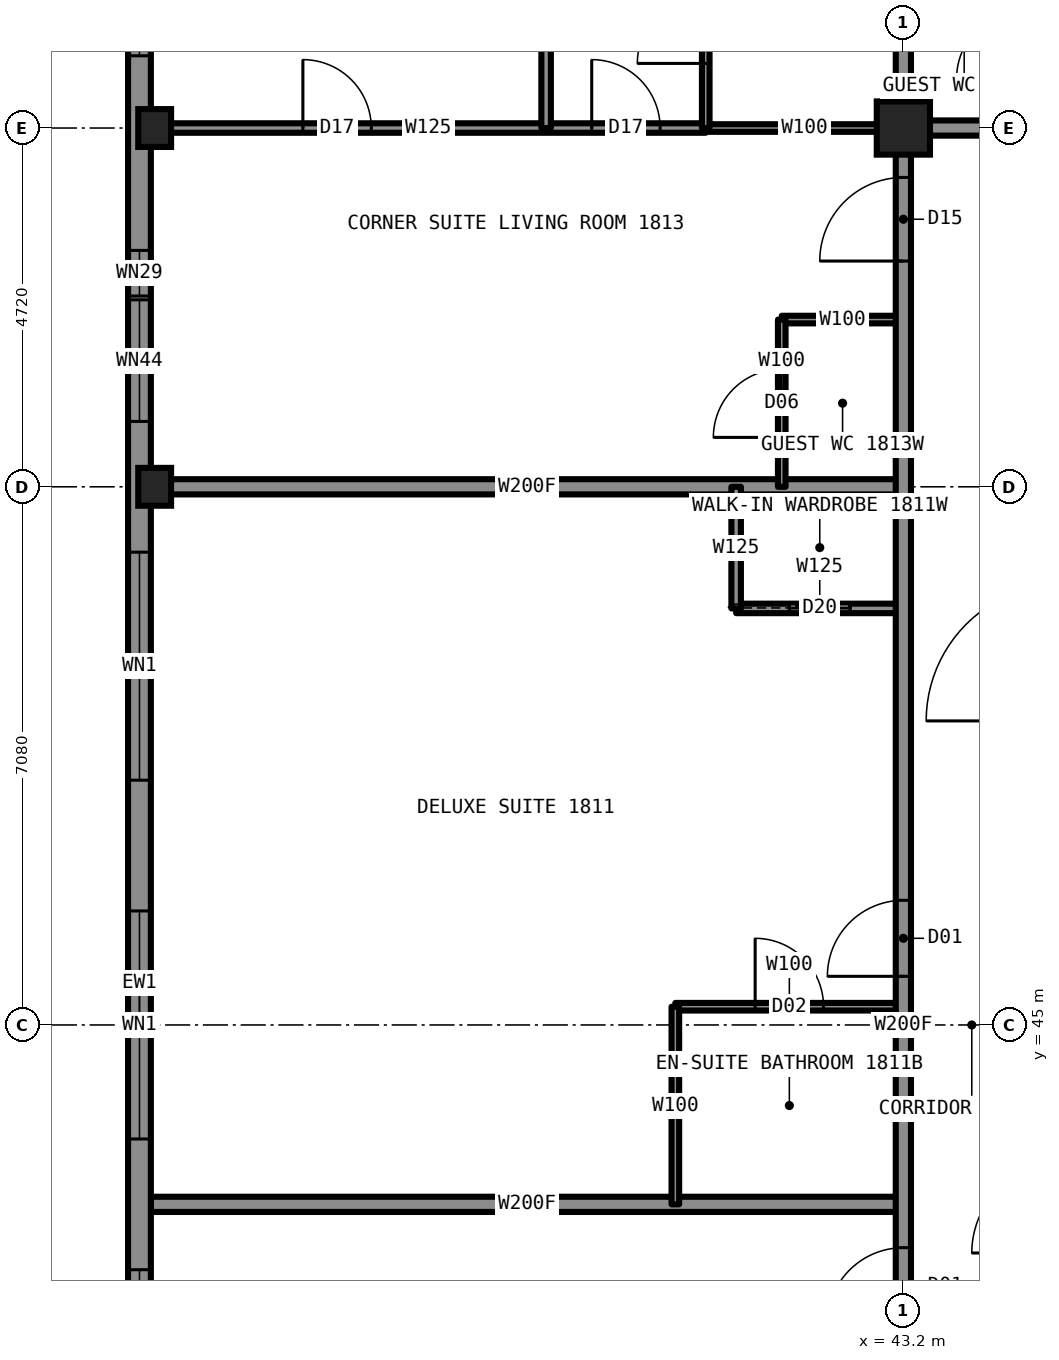
"""IFC4 building model, lengths in metres.
Left out: names, types, materials, properties, quantities, classifications, styles, units other than length and angle.
Written with IfcOpenShell. Run it as: python <this file> out.ifc"""

import sys

from ifc_helpers import new_model, si_unit, direction, frame, frame_2d, origin, origin_2d, place, context, subcontext, project, spatial, rectangle, hollow_rectangle, i_section, extrude, element, fill, save


model = new_model("IFC4")
c1 = context("Model", 3, precision=1e-05, world=origin(), true_north=direction((0.0, 1.0)))
c2 = subcontext(c1, "Body", "Model", "MODEL_VIEW")
j1 = project(units=[si_unit("LENGTHUNIT", "METRE"), si_unit("PLANEANGLEUNIT", "RADIAN")], contexts=[c1])
p1 = place(None, origin())
s1 = spatial("IfcSite", under=j1, at=p1, CompositionType="ELEMENT")
p2 = place(p1, origin())
s2 = spatial("IfcBuilding", under=s1, at=p2, CompositionType="ELEMENT")
p3 = place(p2, frame((0.0, 0.0, 70.5)))
s3 = spatial("IfcBuildingStorey", under=s2, at=p3, CompositionType="ELEMENT", Elevation=70.5)
for number, where, z_axis, x_axis in (
    (1, (33.35, 52.08, 0.0), (0.0, 0.0, 1.0), (1.0, 0.0, 0.0)),
    (2, (33.35, 56.8, 0.0), (0.0, 0.0, 1.0), (1.0, 0.0, 0.0)),
):
    element("IfcColumn", number, at=place(p3, frame(where, z_axis=z_axis, x_axis=x_axis)), inside=s3, PredefinedType="COLUMN", context=c2, shape_type="SweptSolid", body=[
        extrude(i_section(OverallWidth=0.432, OverallDepth=0.498, WebThickness=0.056, FlangeThickness=0.089, at=origin_2d()), origin(), (0.0, 0.0, 1.0), 3.5),
    ])
p4 = place(p3, frame((43.2, 56.8, 0.0), z_axis=(0.0, 0.0, 1.0), x_axis=(1.0, 0.0, 0.0)))
e3 = element("IfcColumn", 3, at=p4, inside=s3, PredefinedType="COLUMN", context=c2, shape_type="SweptSolid", body=[
    extrude(hollow_rectangle(XDim=0.7, YDim=0.7, WallThickness=0.06, at=origin_2d()), origin(), (0.0, 0.0, 1.0), 3.5),
])
p5 = place(p3, frame((33.3, 42.64, 0.0), z_axis=(0.0, 0.0, 1.0), x_axis=(1.0, 0.0, 0.0)))
e4 = element("IfcWall", 4, at=p5, inside=s3, PredefinedType="PARTITIONING", context=c2, shape_type="SweptSolid", body=[
    extrude(rectangle(XDim=9.9, YDim=0.2, at=frame_2d((4.95, 0.0))), origin(), (0.0, 0.0, 1.0), 2.723),
])
p6 = place(p3, frame((40.2, 45.24, 0.0), z_axis=(0.0, 0.0, 1.0), x_axis=(1.0, 0.0, 0.0)))
e5 = element("IfcWall", 5, at=p6, inside=s3, PredefinedType="PARTITIONING", context=c2, shape_type="SweptSolid", body=[
    extrude(rectangle(XDim=3.0, YDim=0.1, at=frame_2d((1.5, 0.0))), origin(), (0.0, 0.0, 1.0), 3.33),
])
p7 = place(p6, frame((1.05, 0.0, 0.0)))
e6 = element("IfcOpeningElement", 6, at=p7, cuts=e5, PredefinedType="OPENING", context=c2, shape_type="SweptSolid", body=[
    extrude(rectangle(XDim=0.9, YDim=2.1, at=frame_2d((0.45, 1.05))), frame((0.0, 0.06, 0.0), z_axis=(0.0, -1.0, 0.0), x_axis=(1.0, 0.0, 0.0)), (0.0, 0.0, 1.0), 0.12),
])
p8 = place(p3, frame((40.6, 56.8, 0.0), z_axis=(0.0, 0.0, 1.0), x_axis=(1.0, 0.0, 0.0)))
e7 = element("IfcWall", 7, at=p8, inside=s3, PredefinedType="PARTITIONING", context=c2, shape_type="SweptSolid", body=[
    extrude(rectangle(XDim=2.6, YDim=0.1, at=frame_2d((1.3, 0.0))), origin(), (0.0, 0.0, 1.0), 2.573),
])
p9 = place(p3, frame((43.2, 56.8, 0.0), z_axis=(0.0, 0.0, 1.0), x_axis=(1.0, 0.0, 0.0)))
e8 = element("IfcWall", 8, at=p9, inside=s3, PredefinedType="PARTITIONING", context=c2, shape_type="SweptSolid", body=[
    extrude(rectangle(XDim=23.6, YDim=0.2, at=frame_2d((11.8, 0.0))), origin(), (0.0, 0.0, 1.0), 3.33),
])
p10 = place(p9, frame((1.85, 0.0, 0.0)))
e9 = element("IfcOpeningElement", 9, at=p10, cuts=e8, PredefinedType="OPENING", context=c2, shape_type="SweptSolid", body=[
    extrude(rectangle(XDim=1.1, YDim=2.2, at=frame_2d((0.55, 1.1))), frame((0.0, 0.11, 0.0), z_axis=(0.0, -1.0, 0.0), x_axis=(1.0, 0.0, 0.0)), (0.0, 0.0, 1.0), 0.22),
])
p11 = place(p9, frame((17.16, 0.0, 0.0)))
e10 = element("IfcOpeningElement", 10, at=p11, cuts=e8, PredefinedType="OPENING", context=c2, shape_type="SweptSolid", body=[
    extrude(rectangle(XDim=1.0, YDim=2.2, at=frame_2d((0.5, 1.1))), frame((0.0, 0.11, 0.0), z_axis=(0.0, -1.0, 0.0), x_axis=(1.0, 0.0, 0.0)), (0.0, 0.0, 1.0), 0.22),
])
p12 = place(p3, frame((33.3, 56.8, 0.0), z_axis=(0.0, 0.0, 1.0), x_axis=(1.0, 0.0, 0.0)))
e11 = element("IfcWall", 11, at=p12, inside=s3, PredefinedType="PARTITIONING", context=c2, shape_type="SweptSolid", body=[
    extrude(rectangle(XDim=7.3, YDim=0.125, at=frame_2d((3.65, 0.0))), origin(), (0.0, 0.0, 1.0), 2.573),
])
p13 = place(p12, frame((5.8, 0.0, 0.0)))
e12 = element("IfcOpeningElement", 12, at=p13, cuts=e11, PredefinedType="OPENING", context=c2, shape_type="SweptSolid", body=[
    extrude(rectangle(XDim=0.9, YDim=2.2, at=frame_2d((0.45, 1.1))), frame((0.0, 0.073, 0.0), z_axis=(0.0, -1.0, 0.0), x_axis=(1.0, 0.0, 0.0)), (0.0, 0.0, 1.0), 0.145),
])
p14 = place(p12, frame((2.0, 0.0, 0.0)))
e13 = element("IfcOpeningElement", 13, at=p14, cuts=e11, PredefinedType="OPENING", context=c2, shape_type="SweptSolid", body=[
    extrude(rectangle(XDim=0.9, YDim=2.2, at=frame_2d((0.45, 1.1))), frame((0.0, 0.073, 0.0), z_axis=(0.0, -1.0, 0.0), x_axis=(1.0, 0.0, 0.0)), (0.0, 0.0, 1.0), 0.145),
])
p15 = place(p3, frame((41.0, 50.48, 0.0), z_axis=(0.0, 0.0, 1.0), x_axis=(1.0, 0.0, 0.0)))
e14 = element("IfcWall", 14, at=p15, inside=s3, PredefinedType="PARTITIONING", context=c2, shape_type="SweptSolid", body=[
    extrude(rectangle(XDim=2.2, YDim=0.125, at=frame_2d((1.1, 0.0))), origin(), (0.0, 0.0, 1.0), 3.33),
])
p16 = place(p15, frame((0.7, 0.0, 0.0)))
e15 = element("IfcOpeningElement", 15, at=p16, cuts=e14, PredefinedType="OPENING", context=c2, shape_type="SweptSolid", body=[
    extrude(rectangle(XDim=0.8, YDim=2.1, at=frame_2d((0.4, 1.05))), frame((0.0, 0.073, 0.0), z_axis=(0.0, -1.0, 0.0), x_axis=(1.0, 0.0, 0.0)), (0.0, 0.0, 1.0), 0.145),
])
p17 = place(p3, frame((33.3, 52.08, 0.0), z_axis=(0.0, 0.0, 1.0), x_axis=(1.0, 0.0, 0.0)))
e16 = element("IfcWall", 16, at=p17, inside=s3, PredefinedType="PARTITIONING", context=c2, shape_type="SweptSolid", body=[
    extrude(rectangle(XDim=9.9, YDim=0.2, at=frame_2d((4.95, 0.0))), origin(), (0.0, 0.0, 1.0), 2.573),
])
p18 = place(p3, frame((41.6, 54.28, 0.0), z_axis=(0.0, 0.0, 1.0), x_axis=(1.0, 0.0, 0.0)))
e17 = element("IfcWall", 17, at=p18, inside=s3, PredefinedType="PARTITIONING", context=c2, shape_type="SweptSolid", body=[
    extrude(rectangle(XDim=1.6, YDim=0.1, at=frame_2d((0.8, 0.0))), origin(), (0.0, 0.0, 1.0), 2.723),
])
p19 = place(p3, frame((43.2, 33.2, 0.0), z_axis=(0.0, 0.0, 1.0), x_axis=(0.0, 1.0, 0.0)))
e18 = element("IfcWall", 18, at=p19, inside=s3, PredefinedType="PARTITIONING", context=c2, shape_type="SweptSolid", body=[
    extrude(rectangle(XDim=23.6, YDim=0.2, at=frame_2d((11.8, 0.0))), origin(), (0.0, 0.0, 1.0), 3.33),
])
p20 = place(p19, frame((7.87, 0.0, 0.0)))
e19 = element("IfcOpeningElement", 19, at=p20, cuts=e18, PredefinedType="OPENING", context=c2, shape_type="SweptSolid", body=[
    extrude(rectangle(XDim=1.0, YDim=2.2, at=frame_2d((0.5, 1.1))), frame((0.0, 0.11, 0.0), z_axis=(0.0, -1.0, 0.0), x_axis=(1.0, 0.0, 0.0)), (0.0, 0.0, 1.0), 0.22),
])
p21 = place(p19, frame((12.44, 0.0, 0.0)))
e20 = element("IfcOpeningElement", 20, at=p21, cuts=e18, PredefinedType="OPENING", context=c2, shape_type="SweptSolid", body=[
    extrude(rectangle(XDim=1.0, YDim=2.2, at=frame_2d((0.5, 1.1))), frame((0.0, 0.11, 0.0), z_axis=(0.0, -1.0, 0.0), x_axis=(1.0, 0.0, 0.0)), (0.0, 0.0, 1.0), 0.22),
])
p22 = place(p19, frame((21.85, 0.0, 0.0)))
e21 = element("IfcOpeningElement", 21, at=p22, cuts=e18, PredefinedType="OPENING", context=c2, shape_type="SweptSolid", body=[
    extrude(rectangle(XDim=1.1, YDim=2.2, at=frame_2d((0.55, 1.1))), frame((0.0, 0.11, 0.0), z_axis=(0.0, -1.0, 0.0), x_axis=(1.0, 0.0, 0.0)), (0.0, 0.0, 1.0), 0.22),
])
p23 = place(p19, frame((0.66, 0.0, 0.0)))
e22 = element("IfcOpeningElement", 22, at=p23, cuts=e18, PredefinedType="OPENING", context=c2, shape_type="SweptSolid", body=[
    extrude(rectangle(XDim=1.1, YDim=2.2, at=frame_2d((0.55, 1.1))), frame((0.0, 0.11, 0.0), z_axis=(0.0, -1.0, 0.0), x_axis=(1.0, 0.0, 0.0)), (0.0, 0.0, 1.0), 0.22),
])
p24 = place(p3, frame((43.2, 56.8, 0.0), z_axis=(0.0, 0.0, 1.0), x_axis=(0.0, 1.0, 0.0)))
e23 = element("IfcWall", 23, at=p24, inside=s3, PredefinedType="PARTITIONING", context=c2, shape_type="SweptSolid", body=[
    extrude(rectangle(XDim=9.9, YDim=0.2, at=frame_2d((4.95, 0.0))), origin(), (0.0, 0.0, 1.0), 2.573),
])
p25 = place(p3, frame((41.6, 52.08, 0.0), z_axis=(0.0, 0.0, 1.0), x_axis=(0.0, 1.0, 0.0)))
e24 = element("IfcWall", 24, at=p25, inside=s3, PredefinedType="PARTITIONING", context=c2, shape_type="SweptSolid", body=[
    extrude(rectangle(XDim=2.2, YDim=0.1, at=frame_2d((1.1, 0.0))), origin(), (0.0, 0.0, 1.0), 3.33),
])
p26 = place(p25, frame((0.65, 0.0, 0.0)))
e25 = element("IfcOpeningElement", 25, at=p26, cuts=e24, PredefinedType="OPENING", context=c2, shape_type="SweptSolid", body=[
    extrude(rectangle(XDim=0.9, YDim=2.1, at=frame_2d((0.45, 1.05))), frame((0.0, 0.06, 0.0), z_axis=(0.0, -1.0, 0.0), x_axis=(1.0, 0.0, 0.0)), (0.0, 0.0, 1.0), 0.12),
])
p27 = place(p3, frame((41.0, 50.48, 0.0), z_axis=(0.0, 0.0, 1.0), x_axis=(0.0, 1.0, 0.0)))
e26 = element("IfcWall", 26, at=p27, inside=s3, PredefinedType="PARTITIONING", context=c2, shape_type="SweptSolid", body=[
    extrude(rectangle(XDim=1.6, YDim=0.125, at=frame_2d((0.8, 0.0))), origin(), (0.0, 0.0, 1.0), 3.33),
])
p28 = place(p3, frame((40.6, 56.8, 0.0), z_axis=(0.0, 0.0, 1.0), x_axis=(0.0, 1.0, 0.0)))
e27 = element("IfcWall", 27, at=p28, inside=s3, PredefinedType="PARTITIONING", context=c2, shape_type="SweptSolid", body=[
    extrude(rectangle(XDim=2.6, YDim=0.1, at=frame_2d((1.3, 0.0))), origin(), (0.0, 0.0, 1.0), 3.33),
])
p29 = place(p28, frame((0.85, 0.0, 0.0)))
e28 = element("IfcOpeningElement", 28, at=p29, cuts=e27, PredefinedType="OPENING", context=c2, shape_type="SweptSolid", body=[
    extrude(rectangle(XDim=0.9, YDim=2.1, at=frame_2d((0.45, 1.05))), frame((0.0, 0.06, 0.0), z_axis=(0.0, -1.0, 0.0), x_axis=(1.0, 0.0, 0.0)), (0.0, 0.0, 1.0), 0.12),
])
p30 = place(p3, frame((40.2, 42.64, 0.0), z_axis=(0.0, 0.0, 1.0), x_axis=(0.0, 1.0, 0.0)))
e29 = element("IfcWall", 29, at=p30, inside=s3, PredefinedType="PARTITIONING", context=c2, shape_type="SweptSolid", body=[
    extrude(rectangle(XDim=2.6, YDim=0.1, at=frame_2d((1.3, 0.0))), origin(), (0.0, 0.0, 1.0), 3.33),
])
p31 = place(p3, frame((38.5, 56.8, 0.0), z_axis=(0.0, 0.0, 1.0), x_axis=(0.0, 1.0, 0.0)))
e30 = element("IfcWall", 30, at=p31, inside=s3, PredefinedType="PARTITIONING", context=c2, shape_type="SweptSolid", body=[
    extrude(rectangle(XDim=9.894, YDim=0.125, at=frame_2d((4.947, 0.0))), origin(), (0.0, 0.0, 1.0), 3.33),
])
p32 = place(p3, frame((33.15, 61.5, 0.0), z_axis=(0.0, 0.0, 1.0), x_axis=(0.0, -1.0, 0.0)))
e31 = element("IfcWall", 31, at=p32, inside=s3, PredefinedType="SOLIDWALL", context=c2, shape_type="SweptSolid", body=[
    extrude(rectangle(XDim=33.0, YDim=0.3, at=frame_2d((16.5, 0.0))), origin(), (0.0, 0.0, 1.0), 2.83),
])
p33 = place(p32, frame((0.85, 0.0, 0.5)))
e32 = element("IfcOpeningElement", 32, at=p33, cuts=e31, PredefinedType="OPENING", context=c2, shape_type="SweptSolid", body=[
    extrude(rectangle(XDim=2.9, YDim=2.0, at=frame_2d((1.45, 1.0))), frame((0.0, 0.16, 0.0), z_axis=(0.0, -1.0, 0.0), x_axis=(1.0, 0.0, 0.0)), (0.0, 0.0, 1.0), 0.32),
])
p34 = place(p32, frame((6.96, 0.0, 0.55)))
e33 = element("IfcOpeningElement", 33, at=p34, cuts=e31, PredefinedType="OPENING", context=c2, shape_type="SweptSolid", body=[
    extrude(rectangle(XDim=1.6, YDim=1.9, at=frame_2d((0.8, 0.95))), frame((0.0, 0.16, 0.0), z_axis=(0.0, -1.0, 0.0), x_axis=(1.0, 0.0, 0.0)), (0.0, 0.0, 1.0), 0.32),
])
p35 = place(p32, frame((10.28, 0.0, 0.5)))
e34 = element("IfcOpeningElement", 34, at=p35, cuts=e31, PredefinedType="OPENING", context=c2, shape_type="SweptSolid", body=[
    extrude(rectangle(XDim=3.0, YDim=2.0, at=frame_2d((1.5, 1.0))), frame((0.0, 0.16, 0.0), z_axis=(0.0, -1.0, 0.0), x_axis=(1.0, 0.0, 0.0)), (0.0, 0.0, 1.0), 0.32),
])
p36 = place(p32, frame((15.0, 0.0, 0.5)))
e35 = element("IfcOpeningElement", 35, at=p36, cuts=e31, PredefinedType="OPENING", context=c2, shape_type="SweptSolid", body=[
    extrude(rectangle(XDim=3.0, YDim=2.0, at=frame_2d((1.5, 1.0))), frame((0.0, 0.16, 0.0), z_axis=(0.0, -1.0, 0.0), x_axis=(1.0, 0.0, 0.0)), (0.0, 0.0, 1.0), 0.32),
])
p37 = place(p32, frame((19.72, 0.0, 0.5)))
e36 = element("IfcOpeningElement", 36, at=p37, cuts=e31, PredefinedType="OPENING", context=c2, shape_type="SweptSolid", body=[
    extrude(rectangle(XDim=3.0, YDim=2.0, at=frame_2d((1.5, 1.0))), frame((0.0, 0.16, 0.0), z_axis=(0.0, -1.0, 0.0), x_axis=(1.0, 0.0, 0.0)), (0.0, 0.0, 1.0), 0.32),
])
p38 = place(p32, frame((24.44, 0.0, 0.55)))
e37 = element("IfcOpeningElement", 37, at=p38, cuts=e31, PredefinedType="OPENING", context=c2, shape_type="SweptSolid", body=[
    extrude(rectangle(XDim=1.6, YDim=1.9, at=frame_2d((0.8, 0.95))), frame((0.0, 0.16, 0.0), z_axis=(0.0, -1.0, 0.0), x_axis=(1.0, 0.0, 0.0)), (0.0, 0.0, 1.0), 0.32),
])
p39 = place(p32, frame((29.25, 0.0, 0.5)))
e38 = element("IfcOpeningElement", 38, at=p39, cuts=e31, PredefinedType="OPENING", context=c2, shape_type="SweptSolid", body=[
    extrude(rectangle(XDim=2.9, YDim=2.0, at=frame_2d((1.45, 1.0))), frame((0.0, 0.16, 0.0), z_axis=(0.0, -1.0, 0.0), x_axis=(1.0, 0.0, 0.0)), (0.0, 0.0, 1.0), 0.32),
])
p40 = place(p32, frame((6.31, 0.0, 1.45)))
e39 = element("IfcOpeningElement", 39, at=p40, cuts=e31, PredefinedType="OPENING", context=c2, shape_type="SweptSolid", body=[
    extrude(rectangle(XDim=0.6, YDim=1.0, at=frame_2d((0.3, 0.5))), frame((0.0, 0.16, 0.0), z_axis=(0.0, -1.0, 0.0), x_axis=(1.0, 0.0, 0.0)), (0.0, 0.0, 1.0), 0.32),
])
p41 = place(p32, frame((26.04, 0.0, 1.45)))
e40 = element("IfcOpeningElement", 40, at=p41, cuts=e31, PredefinedType="OPENING", context=c2, shape_type="SweptSolid", body=[
    extrude(rectangle(XDim=0.6, YDim=1.0, at=frame_2d((0.3, 0.5))), frame((0.0, 0.16, 0.0), z_axis=(0.0, -1.0, 0.0), x_axis=(1.0, 0.0, 0.0)), (0.0, 0.0, 1.0), 0.32),
])
p42 = place(p20, origin())
e41 = element("IfcDoor", 41, at=p42, inside=s3, OperationType="SINGLE_SWING_LEFT", PredefinedType="DOOR", context=c2, shape_type="SweptSolid", body=[
    extrude(rectangle(XDim=1.0, YDim=2.2, at=frame_2d((0.5, 1.1))), frame((0.0, 0.025, 0.0), z_axis=(0.0, -1.0, 0.0), x_axis=(1.0, 0.0, 0.0)), (0.0, 0.0, 1.0), 0.05),
])
fill(e19, e41)
p43 = place(p21, origin())
e42 = element("IfcDoor", 42, at=p43, inside=s3, OperationType="SINGLE_SWING_LEFT", PredefinedType="DOOR", context=c2, shape_type="SweptSolid", body=[
    extrude(rectangle(XDim=1.0, YDim=2.2, at=frame_2d((0.5, 1.1))), frame((0.0, 0.025, 0.0), z_axis=(0.0, -1.0, 0.0), x_axis=(1.0, 0.0, 0.0)), (0.0, 0.0, 1.0), 0.05),
])
fill(e20, e42)
p44 = place(p7, origin())
e43 = element("IfcDoor", 43, at=p44, inside=s3, OperationType="SINGLE_SWING_RIGHT", PredefinedType="DOOR", context=c2, shape_type="SweptSolid", body=[
    extrude(rectangle(XDim=0.9, YDim=2.1, at=frame_2d((0.45, 1.05))), frame((0.0, 0.025, 0.0), z_axis=(0.0, -1.0, 0.0), x_axis=(1.0, 0.0, 0.0)), (0.0, 0.0, 1.0), 0.05),
])
fill(e6, e43)
p45 = place(p16, origin())
e44 = element("IfcDoor", 44, at=p45, inside=s3, OperationType="SLIDING_TO_LEFT", PredefinedType="DOOR", context=c2, shape_type="SweptSolid", body=[
    extrude(rectangle(XDim=0.8, YDim=2.1, at=frame_2d((0.4, 1.05))), frame((0.0, 0.025, 0.0), z_axis=(0.0, -1.0, 0.0), x_axis=(1.0, 0.0, 0.0)), (0.0, 0.0, 1.0), 0.05),
])
fill(e15, e44)
p46 = place(p22, origin())
e45 = element("IfcDoor", 45, at=p46, inside=s3, OperationType="SINGLE_SWING_LEFT", PredefinedType="DOOR", context=c2, shape_type="SweptSolid", body=[
    extrude(rectangle(XDim=1.1, YDim=2.2, at=frame_2d((0.55, 1.1))), frame((0.0, 0.025, 0.0), z_axis=(0.0, -1.0, 0.0), x_axis=(1.0, 0.0, 0.0)), (0.0, 0.0, 1.0), 0.05),
])
fill(e21, e45)
p47 = place(p29, origin())
e46 = element("IfcDoor", 46, at=p47, inside=s3, OperationType="SINGLE_SWING_RIGHT", PredefinedType="DOOR", context=c2, shape_type="SweptSolid", body=[
    extrude(rectangle(XDim=0.9, YDim=2.1, at=frame_2d((0.45, 1.05))), frame((0.0, 0.025, 0.0), z_axis=(0.0, -1.0, 0.0), x_axis=(1.0, 0.0, 0.0)), (0.0, 0.0, 1.0), 0.05),
])
fill(e28, e46)
p48 = place(p13, origin())
e47 = element("IfcDoor", 47, at=p48, inside=s3, OperationType="SINGLE_SWING_LEFT", PredefinedType="DOOR", context=c2, shape_type="SweptSolid", body=[
    extrude(rectangle(XDim=0.9, YDim=2.2, at=frame_2d((0.45, 1.1))), frame((0.0, 0.025, 0.0), z_axis=(0.0, -1.0, 0.0), x_axis=(1.0, 0.0, 0.0)), (0.0, 0.0, 1.0), 0.05),
])
fill(e12, e47)
p49 = place(p14, origin())
e48 = element("IfcDoor", 48, at=p49, inside=s3, OperationType="SINGLE_SWING_LEFT", PredefinedType="DOOR", context=c2, shape_type="SweptSolid", body=[
    extrude(rectangle(XDim=0.9, YDim=2.2, at=frame_2d((0.45, 1.1))), frame((0.0, 0.025, 0.0), z_axis=(0.0, -1.0, 0.0), x_axis=(1.0, 0.0, 0.0)), (0.0, 0.0, 1.0), 0.05),
])
fill(e13, e48)
p50 = place(p26, origin())
e49 = element("IfcDoor", 49, at=p50, inside=s3, OperationType="SINGLE_SWING_LEFT", PredefinedType="DOOR", context=c2, shape_type="SweptSolid", body=[
    extrude(rectangle(XDim=0.9, YDim=2.1, at=frame_2d((0.45, 1.05))), frame((0.0, 0.025, 0.0), z_axis=(0.0, -1.0, 0.0), x_axis=(1.0, 0.0, 0.0)), (0.0, 0.0, 1.0), 0.05),
])
fill(e25, e49)
p51 = place(p33, origin())
e50 = element("IfcWindow", 50, at=p51, inside=s3, PartitioningType="SINGLE_PANEL", PredefinedType="WINDOW", context=c2, shape_type="SweptSolid", body=[
    extrude(rectangle(XDim=2.9, YDim=2.0, at=frame_2d((1.45, 1.0))), frame((0.0, 0.03, 0.0), z_axis=(0.0, -1.0, 0.0), x_axis=(1.0, 0.0, 0.0)), (0.0, 0.0, 1.0), 0.06),
])
fill(e32, e50)
p52 = place(p34, origin())
e51 = element("IfcWindow", 51, at=p52, inside=s3, PartitioningType="SINGLE_PANEL", PredefinedType="WINDOW", context=c2, shape_type="SweptSolid", body=[
    extrude(rectangle(XDim=1.6, YDim=1.9, at=frame_2d((0.8, 0.95))), frame((0.0, 0.03, 0.0), z_axis=(0.0, -1.0, 0.0), x_axis=(1.0, 0.0, 0.0)), (0.0, 0.0, 1.0), 0.06),
])
fill(e33, e51)
p53 = place(p35, origin())
e52 = element("IfcWindow", 52, at=p53, inside=s3, PartitioningType="SINGLE_PANEL", PredefinedType="WINDOW", context=c2, shape_type="SweptSolid", body=[
    extrude(rectangle(XDim=3.0, YDim=2.0, at=frame_2d((1.5, 1.0))), frame((0.0, 0.03, 0.0), z_axis=(0.0, -1.0, 0.0), x_axis=(1.0, 0.0, 0.0)), (0.0, 0.0, 1.0), 0.06),
])
fill(e34, e52)
p54 = place(p36, origin())
e53 = element("IfcWindow", 53, at=p54, inside=s3, PartitioningType="SINGLE_PANEL", PredefinedType="WINDOW", context=c2, shape_type="SweptSolid", body=[
    extrude(rectangle(XDim=3.0, YDim=2.0, at=frame_2d((1.5, 1.0))), frame((0.0, 0.03, 0.0), z_axis=(0.0, -1.0, 0.0), x_axis=(1.0, 0.0, 0.0)), (0.0, 0.0, 1.0), 0.06),
])
fill(e35, e53)
p55 = place(p37, origin())
e54 = element("IfcWindow", 54, at=p55, inside=s3, PartitioningType="SINGLE_PANEL", PredefinedType="WINDOW", context=c2, shape_type="SweptSolid", body=[
    extrude(rectangle(XDim=3.0, YDim=2.0, at=frame_2d((1.5, 1.0))), frame((0.0, 0.03, 0.0), z_axis=(0.0, -1.0, 0.0), x_axis=(1.0, 0.0, 0.0)), (0.0, 0.0, 1.0), 0.06),
])
fill(e36, e54)
p56 = place(p40, origin())
e55 = element("IfcWindow", 55, at=p56, inside=s3, PartitioningType="SINGLE_PANEL", PredefinedType="WINDOW", context=c2, shape_type="SweptSolid", body=[
    extrude(rectangle(XDim=0.6, YDim=1.0, at=frame_2d((0.3, 0.5))), frame((0.0, 0.03, 0.0), z_axis=(0.0, -1.0, 0.0), x_axis=(1.0, 0.0, 0.0)), (0.0, 0.0, 1.0), 0.06),
])
fill(e39, e55)
save(model, sys.argv[1])
